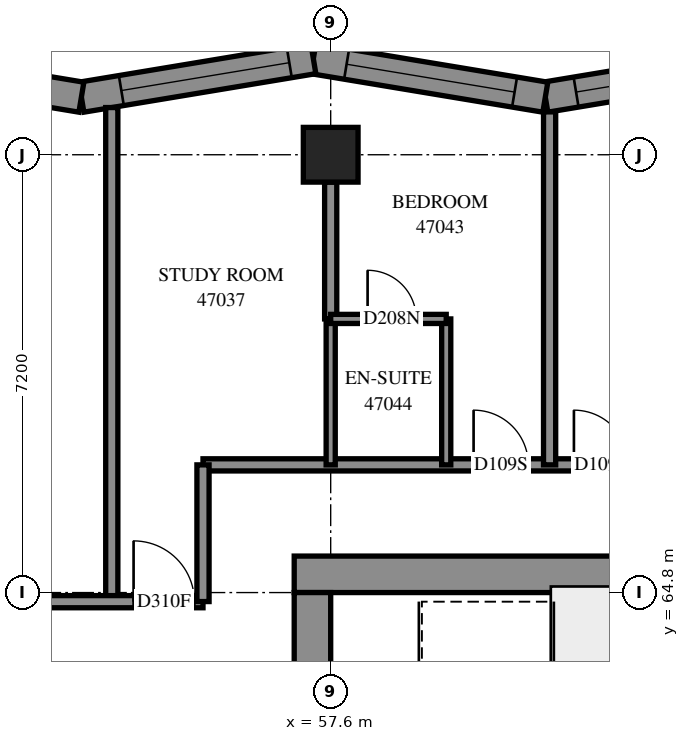
"""IFC4 building model, lengths in metres.
Left out: names, types, materials, properties, quantities, classifications, styles, units other than length and angle.
Written with IfcOpenShell. Run it as: python <this file> out.ifc"""

import sys

from ifc_helpers import new_model, si_unit, direction, frame, frame_2d, origin, origin_2d, place, context, subcontext, project, spatial, polyline, rectangle, outline, extrude, element, fill, save


model = new_model("IFC4")
c1 = context("Model", 3, precision=1e-05, world=origin(), true_north=direction((0.0, 1.0)))
c2 = subcontext(c1, "Body", "Model", "MODEL_VIEW")
j1 = project(units=[si_unit("LENGTHUNIT", "METRE"), si_unit("PLANEANGLEUNIT", "RADIAN")], contexts=[c1])
p1 = place(None, origin())
s1 = spatial("IfcSite", under=j1, at=p1, CompositionType="ELEMENT")
p2 = place(p1, origin())
s2 = spatial("IfcBuilding", under=s1, at=p2, CompositionType="ELEMENT")
p3 = place(p2, frame((0.0, 0.0, 172.8)))
s3 = spatial("IfcBuildingStorey", under=s2, at=p3, CompositionType="ELEMENT", Elevation=172.8)
p4 = place(p3, frame((57.6, 72.0, 0.0), z_axis=(0.0, 0.0, 1.0), x_axis=(1.0, 0.0, 0.0)))
e1 = element("IfcColumn", 1, at=p4, inside=s3, PredefinedType="COLUMN", context=c2, shape_type="SweptSolid", body=[
    extrude(rectangle(XDim=0.9, YDim=0.9, at=origin_2d()), origin(), (0.0, 0.0, 1.0), 3.1),
])
p5 = place(p3, frame((57.0, 65.1, -0.3), z_axis=(0.0, 0.0, 1.0), x_axis=(1.0, 0.0, 0.0)))
e2 = element("IfcWall", 2, at=p5, inside=s3, PredefinedType="SHEAR", context=c2, shape_type="SweptSolid", body=[
    extrude(rectangle(XDim=15.6, YDim=0.6, at=frame_2d((7.8, 0.0))), origin(), (0.0, 0.0, 1.0), 2.7),
])
p6 = place(p5, frame((10.6, 0.0, 0.3)))
e3 = element("IfcOpeningElement", 3, at=p6, cuts=e2, PredefinedType="OPENING", context=c2, shape_type="SweptSolid", body=[
    extrude(rectangle(XDim=0.8, YDim=2.1, at=frame_2d((0.4, 1.05))), frame((0.0, 0.31, 0.0), z_axis=(0.0, -1.0, 0.0), x_axis=(1.0, 0.0, 0.0)), (0.0, 0.0, 1.0), 0.62),
])
p7 = place(p3, frame((57.3, 50.4, -0.3), z_axis=(0.0, 0.0, 1.0), x_axis=(0.0, 1.0, 0.0)))
e4 = element("IfcWall", 4, at=p7, inside=s3, PredefinedType="SHEAR", context=c2, shape_type="SweptSolid", body=[
    extrude(rectangle(XDim=14.4, YDim=0.6, at=frame_2d((7.2, 0.0))), origin(), (0.0, 0.0, 1.0), 2.7),
])
p8 = place(p7, frame((4.55, 0.0, 0.3)))
e5 = element("IfcOpeningElement", 5, at=p8, cuts=e4, PredefinedType="OPENING", context=c2, shape_type="SweptSolid", body=[
    extrude(rectangle(XDim=1.1, YDim=2.1, at=frame_2d((0.55, 1.05))), frame((0.0, 0.31, 0.0), z_axis=(0.0, -1.0, 0.0), x_axis=(1.0, 0.0, 0.0)), (0.0, 0.0, 1.0), 0.62),
])
p9 = place(p7, frame((11.35, 0.0, 0.3)))
e6 = element("IfcOpeningElement", 6, at=p9, cuts=e4, PredefinedType="OPENING", context=c2, shape_type="SweptSolid", body=[
    extrude(rectangle(XDim=1.1, YDim=2.1, at=frame_2d((0.55, 1.05))), frame((0.0, 0.31, 0.0), z_axis=(0.0, -1.0, 0.0), x_axis=(1.0, 0.0, 0.0)), (0.0, 0.0, 1.0), 0.62),
])
p10 = place(p3, frame((64.944, 73.58, 0.0), z_axis=(0.0, 0.0, 1.0), x_axis=(-0.9865103981, -0.1636986085, 0.0)))
e7 = element("IfcWall", 7, at=p10, inside=s3, PredefinedType="SOLIDWALL", context=c2, shape_type="SweptSolid", body=[
    extrude(outline(polyline([(-0.042, -0.25), (3.825, -0.25), (3.908, 0.25), (0.042, 0.25), (-0.042, -0.25)])), origin(), (0.0, 0.0, 1.0), 3.1),
])
p11 = place(p10, frame((0.554, 0.0, 0.45)))
e8 = element("IfcOpeningElement", 8, at=p11, cuts=e7, PredefinedType="OPENING", context=c2, shape_type="SweptSolid", body=[
    extrude(rectangle(XDim=2.8, YDim=2.5, at=frame_2d((1.4, 1.25))), frame((0.0, 0.26, 0.0), z_axis=(0.0, -1.0, 0.0), x_axis=(1.0, 0.0, 0.0)), (0.0, 0.0, 1.0), 0.52),
])
p12 = place(p3, frame((61.13, 72.947, 0.0), z_axis=(0.0, 0.0, 1.0), x_axis=(-0.9865110911, 0.1636944324, 0.0)))
e9 = element("IfcWall", 9, at=p12, inside=s3, PredefinedType="SOLIDWALL", context=c2, shape_type="SweptSolid", body=[
    extrude(outline(polyline([(0.042, -0.25), (3.908, -0.25), (3.825, 0.25), (-0.042, 0.25), (0.042, -0.25)])), origin(), (0.0, 0.0, 1.0), 3.1),
])
p13 = place(p12, frame((0.513, 0.0, 0.45)))
e10 = element("IfcOpeningElement", 10, at=p13, cuts=e9, PredefinedType="OPENING", context=c2, shape_type="SweptSolid", body=[
    extrude(rectangle(XDim=2.8, YDim=2.5, at=frame_2d((1.4, 1.25))), frame((0.0, 0.26, 0.0), z_axis=(0.0, -1.0, 0.0), x_axis=(1.0, 0.0, 0.0)), (0.0, 0.0, 1.0), 0.52),
])
p14 = place(p3, frame((57.315, 73.58, 0.0), z_axis=(0.0, 0.0, 1.0), x_axis=(-0.9865110911, -0.1636944324, 0.0)))
e11 = element("IfcWall", 11, at=p14, inside=s3, PredefinedType="SOLIDWALL", context=c2, shape_type="SweptSolid", body=[
    extrude(outline(polyline([(-0.042, -0.25), (3.825, -0.25), (3.908, 0.25), (0.042, 0.25), (-0.042, -0.25)])), origin(), (0.0, 0.0, 1.0), 3.1),
])
p15 = place(p14, frame((0.401, 0.0, 0.45)))
e12 = element("IfcOpeningElement", 12, at=p15, cuts=e11, PredefinedType="OPENING", context=c2, shape_type="SweptSolid", body=[
    extrude(rectangle(XDim=2.8, YDim=2.5, at=frame_2d((1.4, 1.25))), frame((0.0, 0.26, 0.0), z_axis=(0.0, -1.0, 0.0), x_axis=(1.0, 0.0, 0.0)), (0.0, 0.0, 1.0), 0.52),
])
p16 = place(p3, frame((53.5, 72.947, 0.0), z_axis=(0.0, 0.0, 1.0), x_axis=(-0.9865110911, 0.1636944324, 0.0)))
e13 = element("IfcWall", 13, at=p16, inside=s3, PredefinedType="SOLIDWALL", context=c2, shape_type="SweptSolid", body=[
    extrude(outline(polyline([(0.042, -0.25), (3.908, -0.25), (3.825, 0.25), (-0.042, 0.25), (0.042, -0.25)])), origin(), (0.0, 0.0, 1.0), 3.1),
])
p17 = place(p16, frame((1.071, 0.0, 0.45)))
e14 = element("IfcOpeningElement", 14, at=p17, cuts=e13, PredefinedType="OPENING", context=c2, shape_type="SweptSolid", body=[
    extrude(rectangle(XDim=1.2, YDim=2.5, at=frame_2d((0.6, 1.25))), frame((0.0, 0.26, 0.0), z_axis=(0.0, -1.0, 0.0), x_axis=(1.0, 0.0, 0.0)), (0.0, 0.0, 1.0), 0.52),
])
p18 = place(p3, frame((55.5, 66.9, 0.0), z_axis=(0.0, 0.0, 1.0), x_axis=(1.0, 0.0, 0.0)))
e15 = element("IfcWall", 15, at=p18, inside=s3, PredefinedType="PARTITIONING", context=c2, shape_type="SweptSolid", body=[
    extrude(rectangle(XDim=18.6, YDim=0.2, at=frame_2d((9.3, 0.0))), origin(), (0.0, 0.0, 1.0), 3.1),
])
p19 = place(p18, frame((4.45, 0.0, 0.0)))
e16 = element("IfcOpeningElement", 16, at=p19, cuts=e15, PredefinedType="OPENING", context=c2, shape_type="SweptSolid", body=[
    extrude(rectangle(XDim=0.9, YDim=2.1, at=frame_2d((0.45, 1.05))), frame((0.0, 0.11, 0.0), z_axis=(0.0, -1.0, 0.0), x_axis=(1.0, 0.0, 0.0)), (0.0, 0.0, 1.0), 0.22),
])
p20 = place(p18, frame((6.1, 0.0, 0.0)))
e17 = element("IfcOpeningElement", 17, at=p20, cuts=e15, PredefinedType="OPENING", context=c2, shape_type="SweptSolid", body=[
    extrude(rectangle(XDim=0.9, YDim=2.1, at=frame_2d((0.45, 1.05))), frame((0.0, 0.11, 0.0), z_axis=(0.0, -1.0, 0.0), x_axis=(1.0, 0.0, 0.0)), (0.0, 0.0, 1.0), 0.22),
])
p21 = place(p18, frame((11.65, 0.0, 0.0)))
e18 = element("IfcOpeningElement", 18, at=p21, cuts=e15, PredefinedType="OPENING", context=c2, shape_type="SweptSolid", body=[
    extrude(rectangle(XDim=0.9, YDim=2.1, at=frame_2d((0.45, 1.05))), frame((0.0, 0.11, 0.0), z_axis=(0.0, -1.0, 0.0), x_axis=(1.0, 0.0, 0.0)), (0.0, 0.0, 1.0), 0.22),
])
p22 = place(p18, frame((13.3, 0.0, 0.0)))
e19 = element("IfcOpeningElement", 19, at=p22, cuts=e15, PredefinedType="OPENING", context=c2, shape_type="SweptSolid", body=[
    extrude(rectangle(XDim=0.9, YDim=2.1, at=frame_2d((0.45, 1.05))), frame((0.0, 0.11, 0.0), z_axis=(0.0, -1.0, 0.0), x_axis=(1.0, 0.0, 0.0)), (0.0, 0.0, 1.0), 0.22),
])
p23 = place(p3, frame((54.0, 64.65, 0.0), z_axis=(0.0, 0.0, 1.0), x_axis=(0.0, 1.0, 0.0)))
e20 = element("IfcWall", 20, at=p23, inside=s3, PredefinedType="PARTITIONING", context=c2, shape_type="SweptSolid", body=[
    extrude(rectangle(XDim=8.126, YDim=0.2, at=frame_2d((4.063, 0.0))), origin(), (0.0, 0.0, 1.0), 3.1),
])
p24 = place(p3, frame((61.2, 66.9, 0.0), z_axis=(0.0, 0.0, 1.0), x_axis=(0.0, 1.0, 0.0)))
e21 = element("IfcWall", 21, at=p24, inside=s3, PredefinedType="PARTITIONING", context=c2, shape_type="SweptSolid", body=[
    extrude(rectangle(XDim=5.805, YDim=0.2, at=frame_2d((2.902, 0.0))), origin(), (0.0, 0.0, 1.0), 3.1),
])
p25 = place(p3, frame((50.85, 64.65, 0.0), z_axis=(0.0, 0.0, 1.0), x_axis=(1.0, 0.0, 0.0)))
e22 = element("IfcWall", 22, at=p25, inside=s3, PredefinedType="PARTITIONING", context=c2, shape_type="SweptSolid", body=[
    extrude(rectangle(XDim=4.65, YDim=0.2, at=frame_2d((2.325, 0.0))), origin(), (0.0, 0.0, 1.0), 3.1),
])
p26 = place(p25, frame((3.509, 0.0, 0.0)))
e23 = element("IfcOpeningElement", 23, at=p26, cuts=e22, PredefinedType="OPENING", context=c2, shape_type="SweptSolid", body=[
    extrude(rectangle(XDim=1.0, YDim=2.1, at=frame_2d((0.5, 1.05))), frame((0.0, 0.11, 0.0), z_axis=(0.0, -1.0, 0.0), x_axis=(1.0, 0.0, 0.0)), (0.0, 0.0, 1.0), 0.22),
])
for number, where, z_axis, x_axis in (
    (24, (57.6, 66.9, 0.0), (0.0, 0.0, 1.0), (0.0, 1.0, 0.0)),
    (25, (59.5, 66.9, 0.0), (0.0, 0.0, 1.0), (0.0, 1.0, 0.0)),
):
    element("IfcWall", number, at=place(p3, frame(where, z_axis=z_axis, x_axis=x_axis)), inside=s3, PredefinedType="PARTITIONING", context=c2, shape_type="SweptSolid", body=[
        extrude(rectangle(XDim=2.4, YDim=0.15, at=frame_2d((1.2, 0.0))), origin(), (0.0, 0.0, 1.0), 3.1),
    ])
p27 = place(p3, frame((57.6, 69.3, 0.0), z_axis=(0.0, 0.0, 1.0), x_axis=(0.0, 1.0, 0.0)))
e26 = element("IfcWall", 26, at=p27, inside=s3, PredefinedType="PARTITIONING", context=c2, shape_type="SweptSolid", body=[
    extrude(rectangle(XDim=2.25, YDim=0.2, at=frame_2d((1.125, 0.0))), origin(), (0.0, 0.0, 1.0), 3.1),
])
p28 = place(p3, frame((55.5, 64.652, 0.0), z_axis=(0.0, 0.0, 1.0), x_axis=(0.0, 1.0, 0.0)))
e27 = element("IfcWall", 27, at=p28, inside=s3, PredefinedType="PARTITIONING", context=c2, shape_type="SweptSolid", body=[
    extrude(rectangle(XDim=2.248, YDim=0.2, at=frame_2d((1.124, 0.0))), origin(), (0.0, 0.0, 1.0), 3.1),
])
p29 = place(p3, frame((57.6, 69.3, 0.0), z_axis=(0.0, 0.0, 1.0), x_axis=(1.0, 0.0, 0.0)))
e28 = element("IfcWall", 28, at=p29, inside=s3, PredefinedType="PARTITIONING", context=c2, shape_type="SweptSolid", body=[
    extrude(rectangle(XDim=1.9, YDim=0.15, at=frame_2d((0.95, 0.0))), origin(), (0.0, 0.0, 1.0), 3.1),
])
p30 = place(p29, frame((0.607, 0.0, 0.0)))
e29 = element("IfcOpeningElement", 29, at=p30, cuts=e28, PredefinedType="OPENING", context=c2, shape_type="SweptSolid", body=[
    extrude(rectangle(XDim=0.8, YDim=2.1, at=frame_2d((0.4, 1.05))), frame((0.0, 0.085, 0.0), z_axis=(0.0, -1.0, 0.0), x_axis=(1.0, 0.0, 0.0)), (0.0, 0.0, 1.0), 0.17),
])
p31 = place(p11, origin())
e30 = element("IfcWindow", 30, at=p31, inside=s3, PartitioningType="SINGLE_PANEL", PredefinedType="WINDOW", context=c2, shape_type="SweptSolid", body=[
    extrude(rectangle(XDim=2.8, YDim=2.5, at=frame_2d((1.4, 1.25))), frame((0.0, 0.18, 0.0), z_axis=(0.0, -1.0, 0.0), x_axis=(1.0, 0.0, 0.0)), (0.0, 0.0, 1.0), 0.06),
])
fill(e8, e30)
p32 = place(p13, origin())
e31 = element("IfcWindow", 31, at=p32, inside=s3, PartitioningType="SINGLE_PANEL", PredefinedType="WINDOW", context=c2, shape_type="SweptSolid", body=[
    extrude(rectangle(XDim=2.8, YDim=2.5, at=frame_2d((1.4, 1.25))), frame((0.0, 0.18, 0.0), z_axis=(0.0, -1.0, 0.0), x_axis=(1.0, 0.0, 0.0)), (0.0, 0.0, 1.0), 0.06),
])
fill(e10, e31)
p33 = place(p15, origin())
e32 = element("IfcWindow", 32, at=p33, inside=s3, PartitioningType="SINGLE_PANEL", PredefinedType="WINDOW", context=c2, shape_type="SweptSolid", body=[
    extrude(rectangle(XDim=2.8, YDim=2.5, at=frame_2d((1.4, 1.25))), frame((0.0, 0.18, 0.0), z_axis=(0.0, -1.0, 0.0), x_axis=(1.0, 0.0, 0.0)), (0.0, 0.0, 1.0), 0.06),
])
fill(e12, e32)
p34 = place(p26, origin())
e33 = element("IfcDoor", 33, at=p34, inside=s3, OperationType="SINGLE_SWING_LEFT", PredefinedType="DOOR", context=c2, shape_type="SweptSolid", body=[
    extrude(rectangle(XDim=1.0, YDim=2.1, at=frame_2d((0.5, 1.05))), frame((0.0, 0.025, 0.0), z_axis=(0.0, -1.0, 0.0), x_axis=(1.0, 0.0, 0.0)), (0.0, 0.0, 1.0), 0.05),
])
fill(e23, e33)
p35 = place(p19, origin())
e34 = element("IfcDoor", 34, at=p35, inside=s3, OperationType="SINGLE_SWING_RIGHT", PredefinedType="DOOR", context=c2, shape_type="SweptSolid", body=[
    extrude(rectangle(XDim=0.9, YDim=2.1, at=frame_2d((0.45, 1.05))), frame((0.0, 0.025, 0.0), z_axis=(0.0, -1.0, 0.0), x_axis=(1.0, 0.0, 0.0)), (0.0, 0.0, 1.0), 0.05),
])
fill(e16, e34)
p36 = place(p30, origin())
e35 = element("IfcDoor", 35, at=p36, inside=s3, OperationType="SINGLE_SWING_RIGHT", PredefinedType="DOOR", context=c2, shape_type="SweptSolid", body=[
    extrude(rectangle(XDim=0.8, YDim=2.1, at=frame_2d((0.4, 1.05))), frame((0.0, 0.025, 0.0), z_axis=(0.0, -1.0, 0.0), x_axis=(1.0, 0.0, 0.0)), (0.0, 0.0, 1.0), 0.05),
])
fill(e29, e35)
p37 = place(p20, origin())
e36 = element("IfcDoor", 36, at=p37, inside=s3, OperationType="SINGLE_SWING_LEFT", PredefinedType="DOOR", context=c2, shape_type="SweptSolid", body=[
    extrude(rectangle(XDim=0.9, YDim=2.1, at=frame_2d((0.45, 1.05))), frame((0.0, 0.025, 0.0), z_axis=(0.0, -1.0, 0.0), x_axis=(1.0, 0.0, 0.0)), (0.0, 0.0, 1.0), 0.05),
])
fill(e17, e36)
save(model, sys.argv[1])
